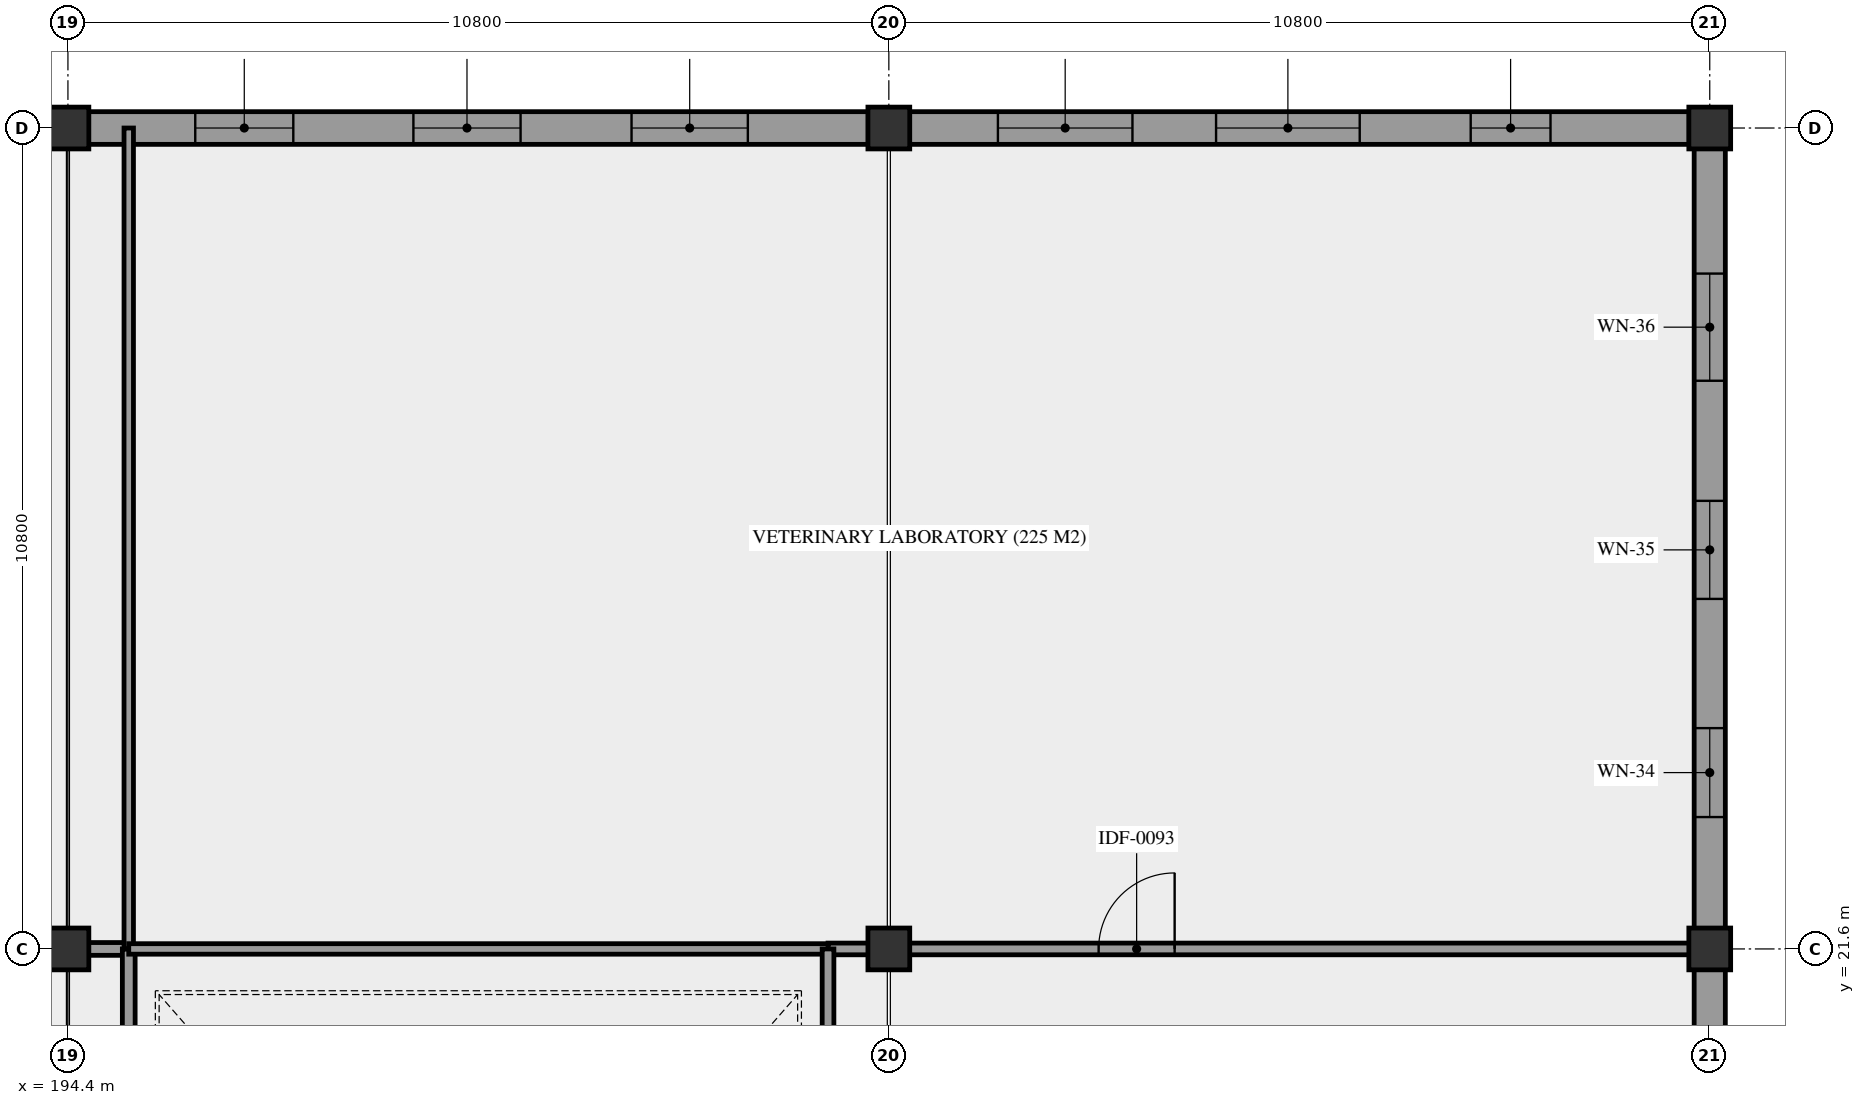
"""IFC4 building model, lengths in metres.
Left out: names, types, materials, properties, quantities, classifications, styles, units other than length and angle.
Written with IfcOpenShell. Run it as: python <this file> out.ifc"""

import sys

from ifc_helpers import new_model, si_unit, direction, frame, frame_2d, origin, origin_2d, place, context, subcontext, project, spatial, rectangle, extrude, element, fill, save


model = new_model("IFC4")
c1 = context("Model", 3, precision=1e-05, world=origin(), true_north=direction((0.0, 1.0)))
c2 = subcontext(c1, "Body", "Model", "MODEL_VIEW")
j1 = project(units=[si_unit("LENGTHUNIT", "METRE"), si_unit("PLANEANGLEUNIT", "RADIAN")], contexts=[c1])
p1 = place(None, origin())
s1 = spatial("IfcSite", under=j1, at=p1, CompositionType="ELEMENT")
p2 = place(p1, origin())
s2 = spatial("IfcBuilding", under=s1, at=p2, CompositionType="ELEMENT")
p3 = place(p2, frame((0.0, 0.0, 10.08)))
s3 = spatial("IfcBuildingStorey", under=s2, at=p3, CompositionType="ELEMENT", Elevation=10.08)
for number, where, z_axis, x_axis in (
    (1, (194.4, 21.6, 0.0), (0.0, 0.0, 1.0), (1.0, 0.0, 0.0)),
    (2, (194.4, 32.4, 0.0), (0.0, 0.0, 1.0), (1.0, 0.0, 0.0)),
    (3, (205.2, 21.6, 0.0), (0.0, 0.0, 1.0), (1.0, 0.0, 0.0)),
    (4, (205.2, 32.4, 0.0), (0.0, 0.0, 1.0), (1.0, 0.0, 0.0)),
    (5, (216.0, 21.6, 0.0), (0.0, 0.0, 1.0), (1.0, 0.0, 0.0)),
    (6, (216.0, 32.4, 0.0), (0.0, 0.0, 1.0), (1.0, 0.0, 0.0)),
):
    element("IfcColumn", number, at=place(p3, frame(where, z_axis=z_axis, x_axis=x_axis)), inside=s3, PredefinedType="COLUMN", context=c2, shape_type="SweptSolid", body=[
        extrude(rectangle(XDim=0.55, YDim=0.55, at=origin_2d()), origin(), (0.0, 0.0, 1.0), 4.68),
    ])
p4 = place(p3, frame((194.67, 32.4, 0.0), z_axis=(0.0, 0.0, 1.0), x_axis=(1.0, 0.0, 0.0)))
e7 = element("IfcWall", 7, at=p4, inside=s3, PredefinedType="STANDARD", context=c2, shape_type="SweptSolid", body=[
    extrude(rectangle(XDim=10.26, YDim=0.43, at=frame_2d((5.13, 0.0))), origin(), (0.0, 0.0, 1.0), 3.53),
])
p5 = place(p4, frame((1.405, 0.0, 0.95)))
e8 = element("IfcOpeningElement", 8, at=p5, cuts=e7, PredefinedType="OPENING", context=c2, shape_type="SweptSolid", body=[
    extrude(rectangle(XDim=1.29, YDim=1.2, at=frame_2d((0.645, 0.6))), frame((0.0, 0.225, 0.0), z_axis=(0.0, -1.0, 0.0), x_axis=(1.0, 0.0, 0.0)), (0.0, 0.0, 1.0), 0.45),
])
p6 = place(p4, frame((4.275, 0.0, 0.95)))
e9 = element("IfcOpeningElement", 9, at=p6, cuts=e7, PredefinedType="OPENING", context=c2, shape_type="SweptSolid", body=[
    extrude(rectangle(XDim=1.41, YDim=1.2, at=frame_2d((0.705, 0.6))), frame((0.0, 0.225, 0.0), z_axis=(0.0, -1.0, 0.0), x_axis=(1.0, 0.0, 0.0)), (0.0, 0.0, 1.0), 0.45),
])
p7 = place(p4, frame((7.145, 0.0, 0.95)))
e10 = element("IfcOpeningElement", 10, at=p7, cuts=e7, PredefinedType="OPENING", context=c2, shape_type="SweptSolid", body=[
    extrude(rectangle(XDim=1.53, YDim=1.2, at=frame_2d((0.765, 0.6))), frame((0.0, 0.225, 0.0), z_axis=(0.0, -1.0, 0.0), x_axis=(1.0, 0.0, 0.0)), (0.0, 0.0, 1.0), 0.45),
])
p8 = place(p3, frame((216.0, 11.07, 0.0), z_axis=(0.0, 0.0, 1.0), x_axis=(0.0, 1.0, 0.0)))
e11 = element("IfcWall", 11, at=p8, inside=s3, PredefinedType="STANDARD", context=c2, shape_type="SweptSolid", body=[
    extrude(rectangle(XDim=10.26, YDim=0.41, at=frame_2d((5.13, 0.0))), origin(), (0.0, 0.0, 1.0), 3.53),
])
p9 = place(p8, frame((1.345, 0.0, 0.95)))
e12 = element("IfcOpeningElement", 12, at=p9, cuts=e11, PredefinedType="OPENING", context=c2, shape_type="SweptSolid", body=[
    extrude(rectangle(XDim=1.41, YDim=1.35, at=frame_2d((0.705, 0.675))), frame((0.0, 0.215, 0.0), z_axis=(0.0, -1.0, 0.0), x_axis=(1.0, 0.0, 0.0)), (0.0, 0.0, 1.0), 0.43),
])
p10 = place(p8, frame((4.215, 0.0, 0.95)))
e13 = element("IfcOpeningElement", 13, at=p10, cuts=e11, PredefinedType="OPENING", context=c2, shape_type="SweptSolid", body=[
    extrude(rectangle(XDim=1.53, YDim=1.35, at=frame_2d((0.765, 0.675))), frame((0.0, 0.215, 0.0), z_axis=(0.0, -1.0, 0.0), x_axis=(1.0, 0.0, 0.0)), (0.0, 0.0, 1.0), 0.43),
])
p11 = place(p8, frame((7.085, 0.0, 0.95)))
e14 = element("IfcOpeningElement", 14, at=p11, cuts=e11, PredefinedType="OPENING", context=c2, shape_type="SweptSolid", body=[
    extrude(rectangle(XDim=1.65, YDim=1.35, at=frame_2d((0.825, 0.675))), frame((0.0, 0.215, 0.0), z_axis=(0.0, -1.0, 0.0), x_axis=(1.0, 0.0, 0.0)), (0.0, 0.0, 1.0), 0.43),
])
p12 = place(p3, frame((205.47, 32.4, 0.0), z_axis=(0.0, 0.0, 1.0), x_axis=(1.0, 0.0, 0.0)))
e15 = element("IfcWall", 15, at=p12, inside=s3, PredefinedType="STANDARD", context=c2, shape_type="SweptSolid", body=[
    extrude(rectangle(XDim=10.26, YDim=0.43, at=frame_2d((5.13, 0.0))), origin(), (0.0, 0.0, 1.0), 3.53),
])
p13 = place(p12, frame((1.165, 0.0, 0.95)))
e16 = element("IfcOpeningElement", 16, at=p13, cuts=e15, PredefinedType="OPENING", context=c2, shape_type="SweptSolid", body=[
    extrude(rectangle(XDim=1.77, YDim=1.35, at=frame_2d((0.885, 0.675))), frame((0.0, 0.225, 0.0), z_axis=(0.0, -1.0, 0.0), x_axis=(1.0, 0.0, 0.0)), (0.0, 0.0, 1.0), 0.45),
])
p14 = place(p12, frame((4.035, 0.0, 0.95)))
e17 = element("IfcOpeningElement", 17, at=p14, cuts=e15, PredefinedType="OPENING", context=c2, shape_type="SweptSolid", body=[
    extrude(rectangle(XDim=1.89, YDim=1.35, at=frame_2d((0.945, 0.675))), frame((0.0, 0.225, 0.0), z_axis=(0.0, -1.0, 0.0), x_axis=(1.0, 0.0, 0.0)), (0.0, 0.0, 1.0), 0.45),
])
p15 = place(p12, frame((7.385, 0.0, 0.95)))
e18 = element("IfcOpeningElement", 18, at=p15, cuts=e15, PredefinedType="OPENING", context=c2, shape_type="SweptSolid", body=[
    extrude(rectangle(XDim=1.05, YDim=1.5, at=frame_2d((0.525, 0.75))), frame((0.0, 0.225, 0.0), z_axis=(0.0, -1.0, 0.0), x_axis=(1.0, 0.0, 0.0)), (0.0, 0.0, 1.0), 0.45),
])
p16 = place(p3, frame((216.0, 21.87, 0.0), z_axis=(0.0, 0.0, 1.0), x_axis=(0.0, 1.0, 0.0)))
e19 = element("IfcWall", 19, at=p16, inside=s3, PredefinedType="STANDARD", context=c2, shape_type="SweptSolid", body=[
    extrude(rectangle(XDim=10.26, YDim=0.41, at=frame_2d((5.13, 0.0))), origin(), (0.0, 0.0, 1.0), 3.53),
])
p17 = place(p16, frame((1.465, 0.0, 0.95)))
e20 = element("IfcOpeningElement", 20, at=p17, cuts=e19, PredefinedType="OPENING", context=c2, shape_type="SweptSolid", body=[
    extrude(rectangle(XDim=1.17, YDim=1.5, at=frame_2d((0.585, 0.75))), frame((0.0, 0.215, 0.0), z_axis=(0.0, -1.0, 0.0), x_axis=(1.0, 0.0, 0.0)), (0.0, 0.0, 1.0), 0.43),
])
p18 = place(p16, frame((4.335, 0.0, 0.95)))
e21 = element("IfcOpeningElement", 21, at=p18, cuts=e19, PredefinedType="OPENING", context=c2, shape_type="SweptSolid", body=[
    extrude(rectangle(XDim=1.29, YDim=1.5, at=frame_2d((0.645, 0.75))), frame((0.0, 0.215, 0.0), z_axis=(0.0, -1.0, 0.0), x_axis=(1.0, 0.0, 0.0)), (0.0, 0.0, 1.0), 0.43),
])
p19 = place(p16, frame((7.205, 0.0, 0.95)))
e22 = element("IfcOpeningElement", 22, at=p19, cuts=e19, PredefinedType="OPENING", context=c2, shape_type="SweptSolid", body=[
    extrude(rectangle(XDim=1.41, YDim=1.5, at=frame_2d((0.705, 0.75))), frame((0.0, 0.215, 0.0), z_axis=(0.0, -1.0, 0.0), x_axis=(1.0, 0.0, 0.0)), (0.0, 0.0, 1.0), 0.43),
])
p20 = place(p3, frame((172.8, 21.6, 0.0), z_axis=(0.0, 0.0, 1.0), x_axis=(1.0, 0.0, 0.0)))
e23 = element("IfcWall", 23, at=p20, inside=s3, PredefinedType="PARTITIONING", context=c2, shape_type="SweptSolid", body=[
    extrude(rectangle(XDim=22.4, YDim=0.168, at=frame_2d((11.2, 0.0))), origin(), (0.0, 0.0, 1.0), 3.23),
])
p21 = place(p20, frame((3.482, 0.0, 0.0)))
e24 = element("IfcOpeningElement", 24, at=p21, cuts=e23, PredefinedType="OPENING", context=c2, shape_type="SweptSolid", body=[
    extrude(rectangle(XDim=1.1, YDim=2.2, at=frame_2d((0.55, 1.1))), frame((0.0, 0.094, 0.0), z_axis=(0.0, -1.0, 0.0), x_axis=(1.0, 0.0, 0.0)), (0.0, 0.0, 1.0), 0.188),
])
p22 = place(p3, frame((204.4, 21.6, 0.0), z_axis=(0.0, 0.0, 1.0), x_axis=(1.0, 0.0, 0.0)))
e25 = element("IfcWall", 25, at=p22, inside=s3, PredefinedType="PARTITIONING", context=c2, shape_type="SweptSolid", body=[
    extrude(rectangle(XDim=11.6, YDim=0.154, at=frame_2d((5.8, 0.0))), origin(), (0.0, 0.0, 1.0), 3.23),
])
p23 = place(p22, frame((3.56, 0.0, 0.0)))
e26 = element("IfcOpeningElement", 26, at=p23, cuts=e25, PredefinedType="OPENING", context=c2, shape_type="SweptSolid", body=[
    extrude(rectangle(XDim=1.0, YDim=2.15, at=frame_2d((0.5, 1.075))), frame((0.0, 0.087, 0.0), z_axis=(0.0, -1.0, 0.0), x_axis=(1.0, 0.0, 0.0)), (0.0, 0.0, 1.0), 0.174),
])
p24 = place(p3, frame((195.2, 17.2, 0.0), z_axis=(0.0, 0.0, 1.0), x_axis=(0.0, 1.0, 0.0)))
e27 = element("IfcWall", 27, at=p24, inside=s3, PredefinedType="PARTITIONING", context=c2, shape_type="SweptSolid", body=[
    extrude(rectangle(XDim=4.4, YDim=0.168, at=frame_2d((2.2, 0.0))), origin(), (0.0, 0.0, 1.0), 3.23),
])
p25 = place(p3, frame((195.2, 21.6, 0.0), z_axis=(0.0, 0.0, 1.0), x_axis=(0.0, 1.0, 0.0)))
e28 = element("IfcWall", 28, at=p25, inside=s3, PredefinedType="PARTITIONING", context=c2, shape_type="SweptSolid", body=[
    extrude(rectangle(XDim=10.8, YDim=0.124, at=frame_2d((5.4, 0.0))), origin(), (0.0, 0.0, 1.0), 3.23),
])
p26 = place(p3, frame((195.2, 21.6, 0.0), z_axis=(0.0, 0.0, 1.0), x_axis=(1.0, 0.0, 0.0)))
e29 = element("IfcWall", 29, at=p26, inside=s3, PredefinedType="PARTITIONING", context=c2, shape_type="SweptSolid", body=[
    extrude(rectangle(XDim=9.2, YDim=0.138, at=frame_2d((4.6, 0.0))), origin(), (0.0, 0.0, 1.0), 3.23),
])
p27 = place(p3, frame((204.4, 5.4, 0.0), z_axis=(0.0, 0.0, 1.0), x_axis=(0.0, 1.0, 0.0)))
e30 = element("IfcWall", 30, at=p27, inside=s3, PredefinedType="PARTITIONING", context=c2, shape_type="SweptSolid", body=[
    extrude(rectangle(XDim=16.2, YDim=0.154, at=frame_2d((8.1, 0.0))), origin(), (0.0, 0.0, 1.0), 3.23),
])
p28 = place(p5, origin())
e31 = element("IfcWindow", 31, at=p28, inside=s3, PartitioningType="SINGLE_PANEL", PredefinedType="WINDOW", context=c2, shape_type="SweptSolid", body=[
    extrude(rectangle(XDim=1.29, YDim=1.2, at=frame_2d((0.645, 0.6))), frame((0.0, 0.03, 0.0), z_axis=(0.0, -1.0, 0.0), x_axis=(1.0, 0.0, 0.0)), (0.0, 0.0, 1.0), 0.06),
])
fill(e8, e31)
p29 = place(p6, origin())
e32 = element("IfcWindow", 32, at=p29, inside=s3, PartitioningType="SINGLE_PANEL", PredefinedType="WINDOW", context=c2, shape_type="SweptSolid", body=[
    extrude(rectangle(XDim=1.41, YDim=1.2, at=frame_2d((0.705, 0.6))), frame((0.0, 0.03, 0.0), z_axis=(0.0, -1.0, 0.0), x_axis=(1.0, 0.0, 0.0)), (0.0, 0.0, 1.0), 0.06),
])
fill(e9, e32)
p30 = place(p7, origin())
e33 = element("IfcWindow", 33, at=p30, inside=s3, PartitioningType="SINGLE_PANEL", PredefinedType="WINDOW", context=c2, shape_type="SweptSolid", body=[
    extrude(rectangle(XDim=1.53, YDim=1.2, at=frame_2d((0.765, 0.6))), frame((0.0, 0.03, 0.0), z_axis=(0.0, -1.0, 0.0), x_axis=(1.0, 0.0, 0.0)), (0.0, 0.0, 1.0), 0.06),
])
fill(e10, e33)
p31 = place(p13, origin())
e34 = element("IfcWindow", 34, at=p31, inside=s3, PartitioningType="SINGLE_PANEL", PredefinedType="WINDOW", context=c2, shape_type="SweptSolid", body=[
    extrude(rectangle(XDim=1.77, YDim=1.35, at=frame_2d((0.885, 0.675))), frame((0.0, 0.03, 0.0), z_axis=(0.0, -1.0, 0.0), x_axis=(1.0, 0.0, 0.0)), (0.0, 0.0, 1.0), 0.06),
])
fill(e16, e34)
p32 = place(p14, origin())
e35 = element("IfcWindow", 35, at=p32, inside=s3, PartitioningType="SINGLE_PANEL", PredefinedType="WINDOW", context=c2, shape_type="SweptSolid", body=[
    extrude(rectangle(XDim=1.89, YDim=1.35, at=frame_2d((0.945, 0.675))), frame((0.0, 0.03, 0.0), z_axis=(0.0, -1.0, 0.0), x_axis=(1.0, 0.0, 0.0)), (0.0, 0.0, 1.0), 0.06),
])
fill(e17, e35)
p33 = place(p15, origin())
e36 = element("IfcWindow", 36, at=p33, inside=s3, PartitioningType="SINGLE_PANEL", PredefinedType="WINDOW", context=c2, shape_type="SweptSolid", body=[
    extrude(rectangle(XDim=1.05, YDim=1.5, at=frame_2d((0.525, 0.75))), frame((0.0, 0.03, 0.0), z_axis=(0.0, -1.0, 0.0), x_axis=(1.0, 0.0, 0.0)), (0.0, 0.0, 1.0), 0.06),
])
fill(e18, e36)
p34 = place(p17, frame((1.17, 0.0, 0.0), z_axis=(0.0, 0.0, 1.0), x_axis=(-1.0, 0.0, 0.0)))
e37 = element("IfcWindow", 37, at=p34, inside=s3, PartitioningType="SINGLE_PANEL", PredefinedType="WINDOW", context=c2, shape_type="SweptSolid", body=[
    extrude(rectangle(XDim=1.17, YDim=1.5, at=frame_2d((0.585, 0.75))), frame((0.0, 0.03, 0.0), z_axis=(0.0, -1.0, 0.0), x_axis=(1.0, 0.0, 0.0)), (0.0, 0.0, 1.0), 0.06),
])
fill(e20, e37)
p35 = place(p18, frame((1.29, 0.0, 0.0), z_axis=(0.0, 0.0, 1.0), x_axis=(-1.0, 0.0, 0.0)))
e38 = element("IfcWindow", 38, at=p35, inside=s3, PartitioningType="SINGLE_PANEL", PredefinedType="WINDOW", context=c2, shape_type="SweptSolid", body=[
    extrude(rectangle(XDim=1.29, YDim=1.5, at=frame_2d((0.645, 0.75))), frame((0.0, 0.03, 0.0), z_axis=(0.0, -1.0, 0.0), x_axis=(1.0, 0.0, 0.0)), (0.0, 0.0, 1.0), 0.06),
])
fill(e21, e38)
p36 = place(p19, frame((1.41, 0.0, 0.0), z_axis=(0.0, 0.0, 1.0), x_axis=(-1.0, 0.0, 0.0)))
e39 = element("IfcWindow", 39, at=p36, inside=s3, PartitioningType="SINGLE_PANEL", PredefinedType="WINDOW", context=c2, shape_type="SweptSolid", body=[
    extrude(rectangle(XDim=1.41, YDim=1.5, at=frame_2d((0.705, 0.75))), frame((0.0, 0.03, 0.0), z_axis=(0.0, -1.0, 0.0), x_axis=(1.0, 0.0, 0.0)), (0.0, 0.0, 1.0), 0.06),
])
fill(e22, e39)
p37 = place(p23, frame((1.0, 0.0, 0.0), z_axis=(0.0, 0.0, 1.0), x_axis=(-1.0, 0.0, 0.0)))
e40 = element("IfcDoor", 40, at=p37, inside=s3, OperationType="SINGLE_SWING_RIGHT", PredefinedType="DOOR", context=c2, shape_type="SweptSolid", body=[
    extrude(rectangle(XDim=1.0, YDim=2.15, at=frame_2d((0.5, 1.075))), frame((0.0, 0.025, 0.0), z_axis=(0.0, -1.0, 0.0), x_axis=(1.0, 0.0, 0.0)), (0.0, 0.0, 1.0), 0.05),
])
fill(e26, e40)
save(model, sys.argv[1])
